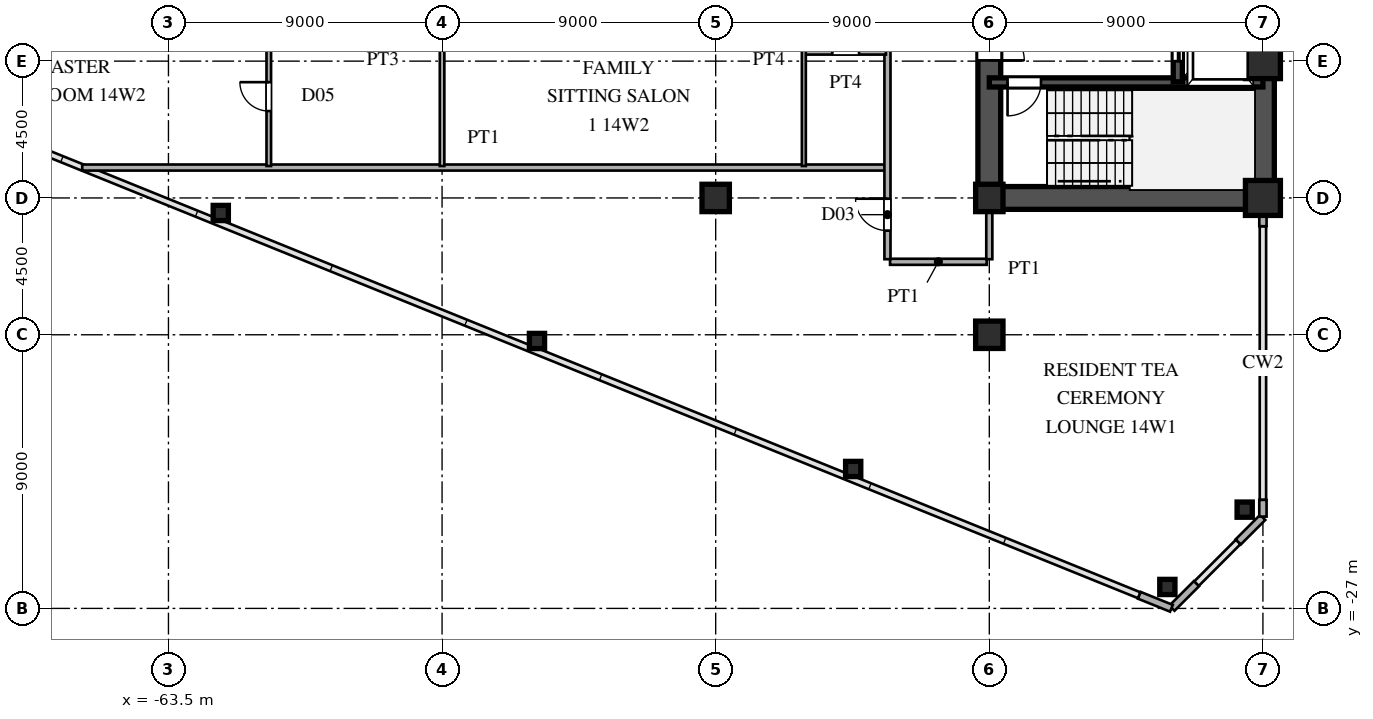
"""IFC4 building model, lengths in metres.
Left out: names, types, materials, properties, quantities, classifications, styles, units other than length and angle.
Written with IfcOpenShell. Run it as: python <this file> out.ifc"""

import sys

from ifc_helpers import new_model, si_unit, direction, frame, frame_2d, origin, origin_2d, place, context, subcontext, project, spatial, rectangle, hollow_rectangle, i_section, extrude, source, transform, mapped, element, fill, save


model = new_model("IFC4")
c1 = context("Model", 3, precision=1e-05, world=origin(), true_north=direction((0.0, 1.0)))
c2 = subcontext(c1, "Body", "Model", "MODEL_VIEW")
j1 = project(units=[si_unit("LENGTHUNIT", "METRE"), si_unit("PLANEANGLEUNIT", "RADIAN")], contexts=[c1])
p1 = place(None, origin())
s1 = spatial("IfcSite", under=j1, at=p1, CompositionType="ELEMENT")
p2 = place(p1, origin())
s2 = spatial("IfcBuilding", under=s1, at=p2, CompositionType="ELEMENT")
p3 = place(p2, frame((0.0, 0.0, 54.9)))
s3 = spatial("IfcBuildingStorey", under=s2, at=p3, CompositionType="ELEMENT", Elevation=54.9)
m1 = source(origin(), c2, "Body", "SweptSolid", [
    extrude(hollow_rectangle(XDim=1.15, YDim=1.15, WallThickness=0.048, at=origin_2d()), origin(), (0.0, 0.0, 1.0), 3.6),
])
for number, where, z_axis, x_axis in (
    (1, (-27.5, -13.5, 0.0), (0.0, 0.0, 1.0), (1.0, 0.0, 0.0)),
    (2, (-27.5, -9.0, 0.0), (0.0, 0.0, 1.0), (1.0, 0.0, 0.0)),
):
    element("IfcColumn", number, at=place(p3, frame(where, z_axis=z_axis, x_axis=x_axis)), inside=s3, PredefinedType="COLUMN", context=c2, shape_type="MappedRepresentation", body=[
        mapped(m1, transform((0.0, 0.0, 0.0), scale=1.0)),
    ])
m2 = source(origin(), c2, "Body", "SweptSolid", [
    extrude(i_section(OverallWidth=0.9, OverallDepth=0.9, WebThickness=0.036, FlangeThickness=0.055, at=origin_2d()), origin(), (0.0, 0.0, 1.0), 3.6),
])
for number, where, z_axis, x_axis in (
    (3, (-36.5, -18.0, 0.0), (0.0, 0.0, 1.0), (1.0, 0.0, 0.0)),
    (4, (-36.5, -13.5, 0.0), (0.0, 0.0, 1.0), (1.0, 0.0, 0.0)),
    (5, (-45.5, -13.5, 0.0), (0.0, 0.0, 1.0), (1.0, 0.0, 0.0)),
):
    element("IfcColumn", number, at=place(p3, frame(where, z_axis=z_axis, x_axis=x_axis)), inside=s3, PredefinedType="COLUMN", context=c2, shape_type="MappedRepresentation", body=[
        mapped(m2, transform((0.0, 0.0, 0.0), scale=1.0)),
    ])
m3 = source(origin(), c2, "Body", "SweptSolid", [
    extrude(hollow_rectangle(XDim=0.5, YDim=0.5, WallThickness=0.02, at=origin_2d()), origin(), (0.0, 0.0, 1.0), 3.6),
])
for number, where, z_axis, x_axis in (
    (6, (-28.1, -23.751, 0.0), (0.0, 0.0, 1.0), (1.0, 0.0, 0.0)),
    (7, (-30.643, -26.295, 0.0), (0.0, 0.0, 1.0), (1.0, 0.0, 0.0)),
    (8, (-40.977, -22.414, 0.0), (0.0, 0.0, 1.0), (1.0, 0.0, 0.0)),
    (9, (-51.378, -18.204, 0.0), (0.0, 0.0, 1.0), (1.0, 0.0, 0.0)),
    (10, (-61.779, -13.994, 0.0), (0.0, 0.0, 1.0), (1.0, 0.0, 0.0)),
):
    element("IfcColumn", number, at=place(p3, frame(where, z_axis=z_axis, x_axis=x_axis)), inside=s3, PredefinedType="COLUMN", context=c2, shape_type="MappedRepresentation", body=[
        mapped(m3, transform((0.0, 0.0, 0.0), scale=1.0)),
    ])
p4 = place(p3, frame((-27.5, -23.98, 0.0), z_axis=(0.0, 0.0, 1.0), x_axis=(0.0, 1.0, 0.0)))
e11 = element("IfcWall", 11, at=p4, inside=s3, PredefinedType="SOLIDWALL", context=c2, shape_type="SweptSolid", body=[
    extrude(rectangle(XDim=0.55, YDim=0.24, at=frame_2d((0.275, 0.0))), origin(), (0.0, 0.0, 1.0), 3.38),
])
p5 = place(p3, frame((-27.5, -14.43, 0.0), z_axis=(0.0, 0.0, 1.0), x_axis=(0.0, 1.0, 0.0)))
e12 = element("IfcWall", 12, at=p5, inside=s3, PredefinedType="SOLIDWALL", context=c2, shape_type="SweptSolid", body=[
    extrude(rectangle(XDim=0.55, YDim=0.24, at=frame_2d((0.275, 0.0))), origin(), (0.0, 0.0, 1.0), 2.88),
])
p6 = place(p3, frame((-31.566, -26.569, 0.0), z_axis=(0.0, 0.0, 1.0), x_axis=(0.927007103665, -0.375043770452, 0.0)))
e13 = element("IfcWall", 13, at=p6, inside=s3, PredefinedType="SOLIDWALL", context=c2, shape_type="SweptSolid", body=[
    extrude(rectangle(XDim=1.14, YDim=0.24, at=frame_2d((0.57, 0.0))), origin(), (0.0, 0.0, 1.0), 3.38),
])
for number, where, z_axis, x_axis in (
    (14, (-30.493, -26.993, 0.0), (0.0, 0.0, 1.0), (0.707, 0.707, 0.0)),
    (15, (-28.313, -24.813, 0.0), (0.0, 0.0, 1.0), (0.707, 0.707, 0.0)),
):
    element("IfcWall", number, at=place(p3, frame(where, z_axis=z_axis, x_axis=x_axis)), inside=s3, PredefinedType="SOLIDWALL", context=c2, shape_type="SweptSolid", body=[
        extrude(rectangle(XDim=1.14, YDim=0.24, at=frame_2d((0.57, 0.0))), origin(), (0.0, 0.0, 1.0), 3.38),
    ])
p7 = place(p3, frame((-27.5, -13.5, 0.0), z_axis=(0.0, 0.0, 1.0), x_axis=(0.0, 1.0, 0.0)))
e16 = element("IfcWall", 16, at=p7, inside=s3, PredefinedType="SHEAR", context=c2, shape_type="SweptSolid", body=[
    extrude(rectangle(XDim=12.2, YDim=0.75, at=frame_2d((6.1, 0.0))), origin(), (0.0, 0.0, 1.0), 3.38),
])
p8 = place(p3, frame((-36.5, -13.5, 0.0), z_axis=(0.0, 0.0, 1.0), x_axis=(1.0, 0.0, 0.0)))
e17 = element("IfcWall", 17, at=p8, inside=s3, PredefinedType="SHEAR", context=c2, shape_type="SweptSolid", body=[
    extrude(rectangle(XDim=9.0, YDim=0.75, at=frame_2d((4.5, 0.0))), origin(), (0.0, 0.0, 1.0), 3.38),
])
p9 = place(p3, frame((-36.5, -13.65, 0.0), z_axis=(0.0, 0.0, 1.0), x_axis=(0.0, 1.0, 0.0)))
e18 = element("IfcWall", 18, at=p9, inside=s3, PredefinedType="SHEAR", context=c2, shape_type="SweptSolid", body=[
    extrude(rectangle(XDim=7.15, YDim=0.75, at=frame_2d((3.575, 0.0))), origin(), (0.0, 0.0, 1.0), 3.38),
])
p10 = place(p9, frame((4.675, 0.0, 0.0)))
e19 = element("IfcOpeningElement", 19, at=p10, cuts=e18, PredefinedType="OPENING", context=c2, shape_type="SweptSolid", body=[
    extrude(rectangle(XDim=1.15, YDim=2.2, at=frame_2d((0.575, 1.1))), frame((0.0, 0.385, 0.0), z_axis=(0.0, -1.0, 0.0), x_axis=(1.0, 0.0, 0.0)), (0.0, 0.0, 1.0), 0.77),
])
p11 = place(p3, frame((-36.5, -9.7, 0.0), z_axis=(0.0, 0.0, 1.0), x_axis=(1.0, 0.0, 0.0)))
e20 = element("IfcWall", 20, at=p11, inside=s3, PredefinedType="SHEAR", context=c2, shape_type="SweptSolid", body=[
    extrude(rectangle(XDim=9.0, YDim=0.3, at=frame_2d((4.5, 0.0))), origin(), (0.0, 0.0, 1.0), 3.38),
])
p12 = place(p11, frame((0.6, 0.0, 0.0)))
e21 = element("IfcOpeningElement", 21, at=p12, cuts=e20, PredefinedType="OPENING", context=c2, shape_type="SweptSolid", body=[
    extrude(rectangle(XDim=1.1, YDim=2.2, at=frame_2d((0.55, 1.1))), frame((0.0, 0.16, 0.0), z_axis=(0.0, -1.0, 0.0), x_axis=(1.0, 0.0, 0.0)), (0.0, 0.0, 1.0), 0.32),
])
p13 = place(p3, frame((-30.3, -9.68, 0.0), z_axis=(0.0, 0.0, 1.0), x_axis=(0.0, 1.0, 0.0)))
e22 = element("IfcWall", 22, at=p13, inside=s3, PredefinedType="SHEAR", context=c2, shape_type="SweptSolid", body=[
    extrude(rectangle(XDim=2.56, YDim=0.3, at=frame_2d((1.28, 0.0))), origin(), (0.0, 0.0, 1.0), 3.38),
])
p14 = place(p13, frame((0.68, 0.0, 0.0)))
e23 = element("IfcOpeningElement", 23, at=p14, cuts=e22, PredefinedType="OPENING", context=c2, shape_type="SweptSolid", body=[
    extrude(rectangle(XDim=1.2, YDim=2.25, at=frame_2d((0.6, 1.125))), frame((0.0, 0.16, 0.0), z_axis=(0.0, -1.0, 0.0), x_axis=(1.0, 0.0, 0.0)), (0.0, 0.0, 1.0), 0.32),
])
p15 = place(p3, frame((-39.765, -15.6, 0.0), z_axis=(0.0, 0.0, 1.0), x_axis=(1.0, 0.0, 0.0)))
e24 = element("IfcWall", 24, at=p15, inside=s3, PredefinedType="PARTITIONING", context=c2, shape_type="SweptSolid", body=[
    extrude(rectangle(XDim=3.18, YDim=0.2, at=frame_2d((1.59, 0.0))), origin(), (0.0, 0.0, 1.0), 3.38),
])
p16 = place(p3, frame((-66.337, -12.5, 0.0), z_axis=(0.0, 0.0, 1.0), x_axis=(1.0, 0.0, 0.0)))
e25 = element("IfcWall", 25, at=p16, inside=s3, PredefinedType="PARTITIONING", context=c2, shape_type="SweptSolid", body=[
    extrude(rectangle(XDim=26.407, YDim=0.2, at=frame_2d((13.204, 0.0))), origin(), (0.0, 0.0, 1.0), 3.38),
])
p17 = place(p3, frame((-42.55, -8.72, 0.0), z_axis=(0.0, 0.0, 1.0), x_axis=(1.0, 0.0, 0.0)))
e26 = element("IfcWall", 26, at=p17, inside=s3, PredefinedType="PARTITIONING", context=c2, shape_type="SweptSolid", body=[
    extrude(rectangle(XDim=2.65, YDim=0.13, at=frame_2d((1.325, 0.0))), origin(), (0.0, 0.0, 1.0), 3.38),
])
p18 = place(p17, frame((0.885, 0.0, 0.0)))
e27 = element("IfcOpeningElement", 27, at=p18, cuts=e26, PredefinedType="OPENING", context=c2, shape_type="SweptSolid", body=[
    extrude(rectangle(XDim=0.88, YDim=2.1, at=frame_2d((0.44, 1.05))), frame((0.0, 0.075, 0.0), z_axis=(0.0, -1.0, 0.0), x_axis=(1.0, 0.0, 0.0)), (0.0, 0.0, 1.0), 0.15),
])
p19 = place(p3, frame((-60.2, -12.45, 0.0), z_axis=(0.0, 0.0, 1.0), x_axis=(0.0, 1.0, 0.0)))
e28 = element("IfcWall", 28, at=p19, inside=s3, PredefinedType="PARTITIONING", context=c2, shape_type="SweptSolid", body=[
    extrude(rectangle(XDim=24.9, YDim=0.15, at=frame_2d((12.45, 0.0))), origin(), (0.0, 0.0, 1.0), 3.38),
])
p20 = place(p19, frame((1.808, 0.0, 0.0)))
e29 = element("IfcOpeningElement", 29, at=p20, cuts=e28, PredefinedType="OPENING", context=c2, shape_type="SweptSolid", body=[
    extrude(rectangle(XDim=0.95, YDim=2.15, at=frame_2d((0.475, 1.075))), frame((0.0, 0.085, 0.0), z_axis=(0.0, -1.0, 0.0), x_axis=(1.0, 0.0, 0.0)), (0.0, 0.0, 1.0), 0.17),
])
p21 = place(p19, frame((6.475, 0.0, 0.0)))
e30 = element("IfcOpeningElement", 30, at=p21, cuts=e28, PredefinedType="OPENING", context=c2, shape_type="SweptSolid", body=[
    extrude(rectangle(XDim=0.95, YDim=2.15, at=frame_2d((0.475, 1.075))), frame((0.0, 0.085, 0.0), z_axis=(0.0, -1.0, 0.0), x_axis=(1.0, 0.0, 0.0)), (0.0, 0.0, 1.0), 0.17),
])
p22 = place(p19, frame((11.142, 0.0, 0.0)))
e31 = element("IfcOpeningElement", 31, at=p22, cuts=e28, PredefinedType="OPENING", context=c2, shape_type="SweptSolid", body=[
    extrude(rectangle(XDim=0.95, YDim=2.15, at=frame_2d((0.475, 1.075))), frame((0.0, 0.085, 0.0), z_axis=(0.0, -1.0, 0.0), x_axis=(1.0, 0.0, 0.0)), (0.0, 0.0, 1.0), 0.17),
])
p23 = place(p19, frame((15.308, 0.0, 0.0)))
e32 = element("IfcOpeningElement", 32, at=p23, cuts=e28, PredefinedType="OPENING", context=c2, shape_type="SweptSolid", body=[
    extrude(rectangle(XDim=0.95, YDim=2.15, at=frame_2d((0.475, 1.075))), frame((0.0, 0.085, 0.0), z_axis=(0.0, -1.0, 0.0), x_axis=(1.0, 0.0, 0.0)), (0.0, 0.0, 1.0), 0.17),
])
p24 = place(p19, frame((18.975, 0.0, 0.0)))
e33 = element("IfcOpeningElement", 33, at=p24, cuts=e28, PredefinedType="OPENING", context=c2, shape_type="SweptSolid", body=[
    extrude(rectangle(XDim=0.95, YDim=2.15, at=frame_2d((0.475, 1.075))), frame((0.0, 0.085, 0.0), z_axis=(0.0, -1.0, 0.0), x_axis=(1.0, 0.0, 0.0)), (0.0, 0.0, 1.0), 0.17),
])
p25 = place(p19, frame((22.642, 0.0, 0.0)))
e34 = element("IfcOpeningElement", 34, at=p25, cuts=e28, PredefinedType="OPENING", context=c2, shape_type="SweptSolid", body=[
    extrude(rectangle(XDim=0.95, YDim=2.15, at=frame_2d((0.475, 1.075))), frame((0.0, 0.085, 0.0), z_axis=(0.0, -1.0, 0.0), x_axis=(1.0, 0.0, 0.0)), (0.0, 0.0, 1.0), 0.17),
])
p26 = place(p3, frame((-54.5, -12.45, 0.0), z_axis=(0.0, 0.0, 1.0), x_axis=(0.0, 1.0, 0.0)))
e35 = element("IfcWall", 35, at=p26, inside=s3, PredefinedType="PARTITIONING", context=c2, shape_type="SweptSolid", body=[
    extrude(rectangle(XDim=24.9, YDim=0.15, at=frame_2d((12.45, 0.0))), origin(), (0.0, 0.0, 1.0), 2.68),
])
p27 = place(p26, frame((6.475, 0.0, 0.0)))
e36 = element("IfcOpeningElement", 36, at=p27, cuts=e35, PredefinedType="OPENING", context=c2, shape_type="SweptSolid", body=[
    extrude(rectangle(XDim=0.95, YDim=2.15, at=frame_2d((0.475, 1.075))), frame((0.0, 0.085, 0.0), z_axis=(0.0, -1.0, 0.0), x_axis=(1.0, 0.0, 0.0)), (0.0, 0.0, 1.0), 0.17),
])
p28 = place(p26, frame((18.975, 0.0, 0.0)))
e37 = element("IfcOpeningElement", 37, at=p28, cuts=e35, PredefinedType="OPENING", context=c2, shape_type="SweptSolid", body=[
    extrude(rectangle(XDim=0.95, YDim=2.15, at=frame_2d((0.475, 1.075))), frame((0.0, 0.085, 0.0), z_axis=(0.0, -1.0, 0.0), x_axis=(1.0, 0.0, 0.0)), (0.0, 0.0, 1.0), 0.17),
])
p29 = place(p3, frame((-42.6, -12.45, 0.0), z_axis=(0.0, 0.0, 1.0), x_axis=(0.0, 1.0, 0.0)))
e38 = element("IfcWall", 38, at=p29, inside=s3, PredefinedType="PARTITIONING", context=c2, shape_type="SweptSolid", body=[
    extrude(rectangle(XDim=9.233, YDim=0.13, at=frame_2d((4.616, 0.0))), origin(), (0.0, 0.0, 1.0), 3.38),
])
p30 = place(p29, frame((6.475, 0.0, 0.0)))
e39 = element("IfcOpeningElement", 39, at=p30, cuts=e38, PredefinedType="OPENING", context=c2, shape_type="SweptSolid", body=[
    extrude(rectangle(XDim=0.95, YDim=2.15, at=frame_2d((0.475, 1.075))), frame((0.0, 0.075, 0.0), z_axis=(0.0, -1.0, 0.0), x_axis=(1.0, 0.0, 0.0)), (0.0, 0.0, 1.0), 0.15),
])
p31 = place(p3, frame((-39.85, -15.515, 0.0), z_axis=(0.0, 0.0, 1.0), x_axis=(0.0, 1.0, 0.0)))
e40 = element("IfcWall", 40, at=p31, inside=s3, PredefinedType="PARTITIONING", context=c2, shape_type="SweptSolid", body=[
    extrude(rectangle(XDim=31.03, YDim=0.2, at=frame_2d((15.515, 0.0))), origin(), (0.0, 0.0, 1.0), 3.38),
])
p32 = place(p31, frame((0.94, 0.0, 0.0)))
e41 = element("IfcOpeningElement", 41, at=p32, cuts=e40, PredefinedType="OPENING", context=c2, shape_type="SweptSolid", body=[
    extrude(rectangle(XDim=1.05, YDim=2.25, at=frame_2d((0.525, 1.125))), frame((0.0, 0.11, 0.0), z_axis=(0.0, -1.0, 0.0), x_axis=(1.0, 0.0, 0.0)), (0.0, 0.0, 1.0), 0.22),
])
p33 = place(p31, frame((9.28, 0.0, 0.0)))
e42 = element("IfcOpeningElement", 42, at=p33, cuts=e40, PredefinedType="OPENING", context=c2, shape_type="SweptSolid", body=[
    extrude(rectangle(XDim=1.05, YDim=2.25, at=frame_2d((0.525, 1.125))), frame((0.0, 0.11, 0.0), z_axis=(0.0, -1.0, 0.0), x_axis=(1.0, 0.0, 0.0)), (0.0, 0.0, 1.0), 0.22),
])
p34 = place(p31, frame((21.825, 0.0, 0.0)))
e43 = element("IfcOpeningElement", 43, at=p34, cuts=e40, PredefinedType="OPENING", context=c2, shape_type="SweptSolid", body=[
    extrude(rectangle(XDim=1.05, YDim=2.25, at=frame_2d((0.525, 1.125))), frame((0.0, 0.11, 0.0), z_axis=(0.0, -1.0, 0.0), x_axis=(1.0, 0.0, 0.0)), (0.0, 0.0, 1.0), 0.22),
])
p35 = place(p31, frame((29.04, 0.0, 0.0)))
e44 = element("IfcOpeningElement", 44, at=p35, cuts=e40, PredefinedType="OPENING", context=c2, shape_type="SweptSolid", body=[
    extrude(rectangle(XDim=1.05, YDim=2.25, at=frame_2d((0.525, 1.125))), frame((0.0, 0.11, 0.0), z_axis=(0.0, -1.0, 0.0), x_axis=(1.0, 0.0, 0.0)), (0.0, 0.0, 1.0), 0.22),
])
p36 = place(p3, frame((-36.5, -15.515, 0.0), z_axis=(0.0, 0.0, 1.0), x_axis=(0.0, 1.0, 0.0)))
e45 = element("IfcWall", 45, at=p36, inside=s3, PredefinedType="PARTITIONING", context=c2, shape_type="SweptSolid", body=[
    extrude(rectangle(XDim=1.635, YDim=0.2, at=frame_2d((0.817, 0.0))), origin(), (0.0, 0.0, 1.0), 2.68),
])
m4 = source(origin(), c2, "Body", "SweptSolid", [
    extrude(rectangle(XDim=1.15, YDim=2.2, at=frame_2d((0.575, 1.1))), frame((0.0, 0.025, 0.0), z_axis=(0.0, -1.0, 0.0), x_axis=(1.0, 0.0, 0.0)), (0.0, 0.0, 1.0), 0.05),
])
p37 = place(p10, frame((1.15, 0.0, 0.0), z_axis=(0.0, 0.0, 1.0), x_axis=(-1.0, 0.0, 0.0)))
e46 = element("IfcDoor", 46, at=p37, inside=s3, OperationType="SINGLE_SWING_LEFT", PredefinedType="DOOR", context=c2, shape_type="MappedRepresentation", body=[
    mapped(m4, transform((0.0, 0.0, 0.0), scale=1.0)),
])
fill(e19, e46)
m5 = source(origin(), c2, "Body", "SweptSolid", [
    extrude(rectangle(XDim=1.1, YDim=2.2, at=frame_2d((0.55, 1.1))), frame((0.0, 0.025, 0.0), z_axis=(0.0, -1.0, 0.0), x_axis=(1.0, 0.0, 0.0)), (0.0, 0.0, 1.0), 0.05),
])
p38 = place(p12, frame((1.1, 0.0, 0.0), z_axis=(0.0, 0.0, 1.0), x_axis=(-1.0, 0.0, 0.0)))
e47 = element("IfcDoor", 47, at=p38, inside=s3, OperationType="SINGLE_SWING_LEFT", PredefinedType="DOOR", context=c2, shape_type="MappedRepresentation", body=[
    mapped(m5, transform((0.0, 0.0, 0.0), scale=1.0)),
])
fill(e21, e47)
m6 = source(origin(), c2, "Body", "SweptSolid", [
    extrude(rectangle(XDim=1.2, YDim=2.25, at=frame_2d((0.6, 1.125))), frame((0.0, 0.025, 0.0), z_axis=(0.0, -1.0, 0.0), x_axis=(1.0, 0.0, 0.0)), (0.0, 0.0, 1.0), 0.05),
])
p39 = place(p14, origin())
e48 = element("IfcDoor", 48, at=p39, inside=s3, OperationType="DOUBLE_DOOR_SLIDING", PredefinedType="DOOR", context=c2, shape_type="MappedRepresentation", body=[
    mapped(m6, transform((0.0, 0.0, 0.0), scale=1.0)),
])
fill(e23, e48)
m7 = source(origin(), c2, "Body", "SweptSolid", [
    extrude(rectangle(XDim=0.88, YDim=2.1, at=frame_2d((0.44, 1.05))), frame((0.0, 0.025, 0.0), z_axis=(0.0, -1.0, 0.0), x_axis=(1.0, 0.0, 0.0)), (0.0, 0.0, 1.0), 0.05),
])
p40 = place(p18, origin())
e49 = element("IfcDoor", 49, at=p40, inside=s3, OperationType="SINGLE_SWING_LEFT", PredefinedType="DOOR", context=c2, shape_type="MappedRepresentation", body=[
    mapped(m7, transform((0.0, 0.0, 0.0), scale=1.0)),
])
fill(e27, e49)
m8 = source(origin(), c2, "Body", "SweptSolid", [
    extrude(rectangle(XDim=0.95, YDim=2.15, at=frame_2d((0.475, 1.075))), frame((0.0, 0.025, 0.0), z_axis=(0.0, -1.0, 0.0), x_axis=(1.0, 0.0, 0.0)), (0.0, 0.0, 1.0), 0.05),
])
p41 = place(p20, origin())
e50 = element("IfcDoor", 50, at=p41, inside=s3, OperationType="SINGLE_SWING_RIGHT", PredefinedType="DOOR", context=c2, shape_type="MappedRepresentation", body=[
    mapped(m8, transform((0.0, 0.0, 0.0), scale=1.0)),
])
fill(e29, e50)
m9 = source(origin(), c2, "Body", "SweptSolid", [
    extrude(rectangle(XDim=1.05, YDim=2.25, at=frame_2d((0.525, 1.125))), frame((0.0, 0.025, 0.0), z_axis=(0.0, -1.0, 0.0), x_axis=(1.0, 0.0, 0.0)), (0.0, 0.0, 1.0), 0.05),
])
p42 = place(p32, origin())
e51 = element("IfcDoor", 51, at=p42, inside=s3, OperationType="SINGLE_SWING_RIGHT", PredefinedType="DOOR", context=c2, shape_type="MappedRepresentation", body=[
    mapped(m9, transform((0.0, 0.0, 0.0), scale=1.0)),
])
fill(e41, e51)
save(model, sys.argv[1])
